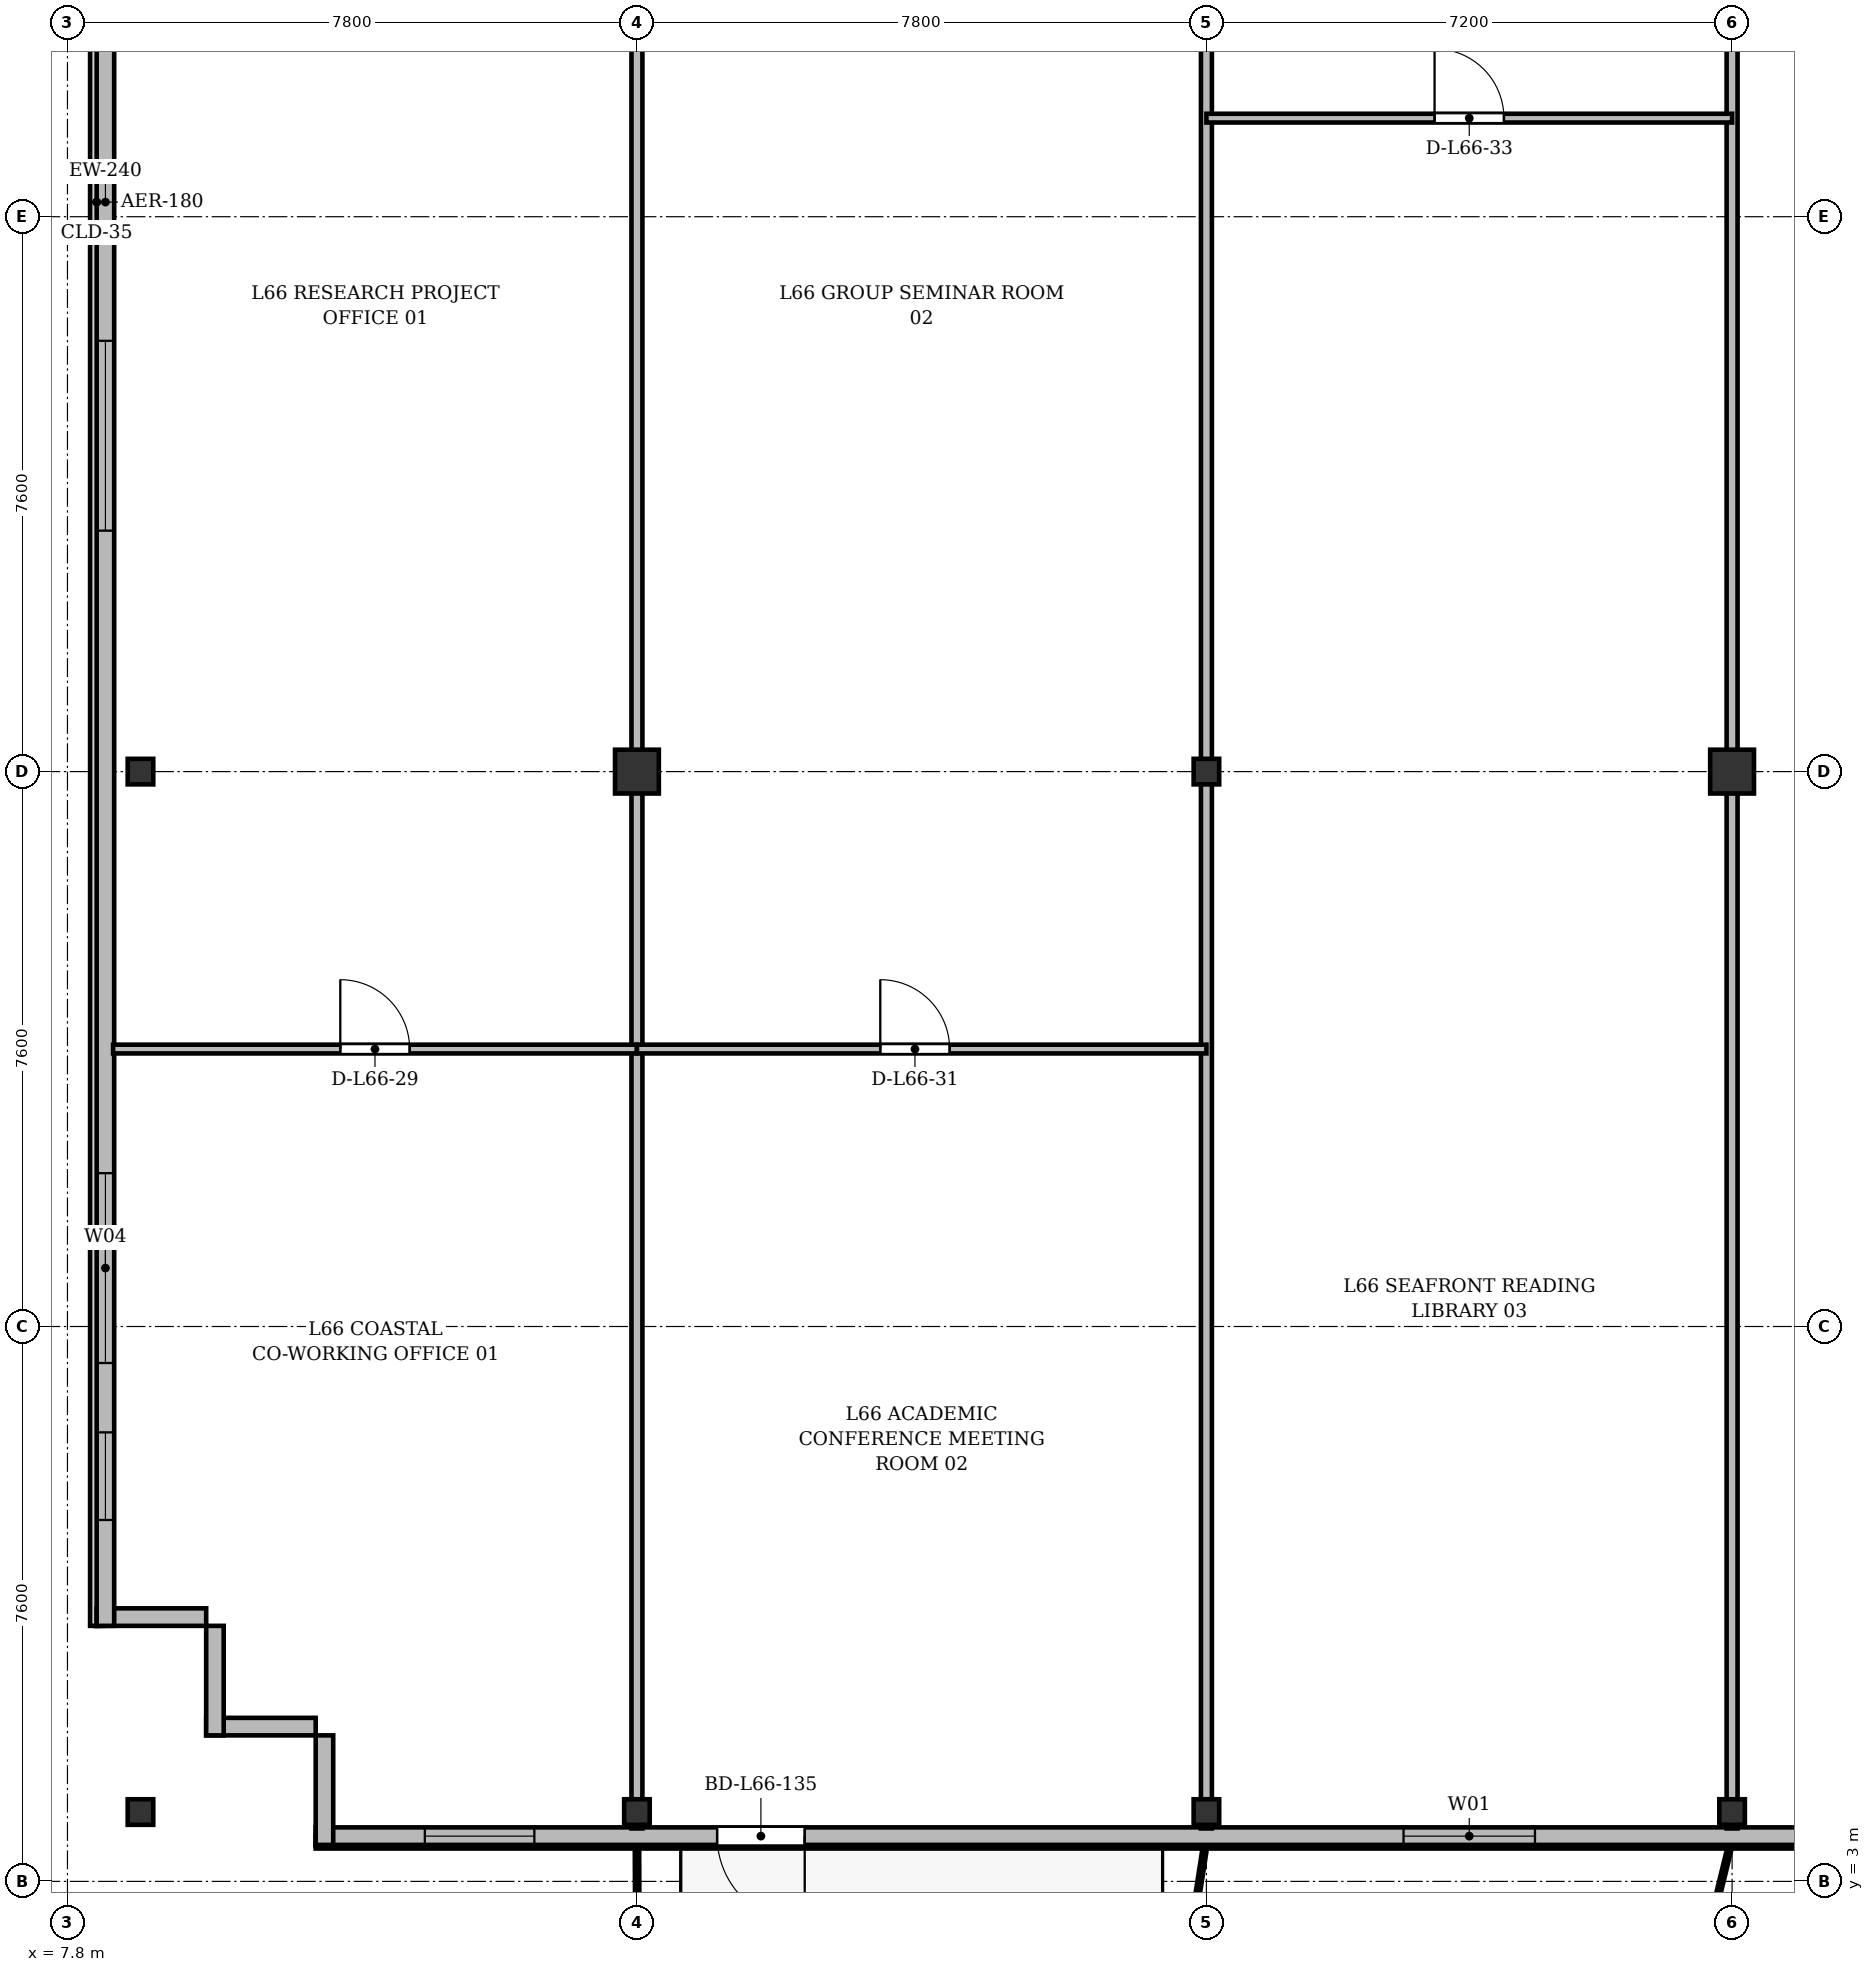
"""IFC4 building model, lengths in metres.
Left out: names, types, materials, properties, quantities, classifications, styles, units other than length and angle.
Written with IfcOpenShell. Run it as: python <this file> out.ifc"""

import sys

from ifc_helpers import new_model, si_unit, direction, frame, frame_2d, origin, origin_2d, place, context, subcontext, project, spatial, rectangle, i_section, extrude, source, transform, mapped, element, fill, save


model = new_model("IFC4")
c1 = context("Model", 3, precision=1e-05, world=origin(), true_north=direction((0.0, 1.0)))
c2 = subcontext(c1, "Body", "Model", "MODEL_VIEW")
j1 = project(units=[si_unit("LENGTHUNIT", "METRE"), si_unit("PLANEANGLEUNIT", "RADIAN")], contexts=[c1])
p1 = place(None, origin())
s1 = spatial("IfcSite", under=j1, at=p1, CompositionType="ELEMENT")
p2 = place(p1, origin())
s2 = spatial("IfcBuilding", under=s1, at=p2, CompositionType="ELEMENT")
p3 = place(p2, frame((0.0, 0.0, 255.9)))
s3 = spatial("IfcBuildingStorey", under=s2, at=p3, CompositionType="ELEMENT", Elevation=255.9)
m1 = source(origin(), c2, "Body", "SweptSolid", [
    extrude(i_section(OverallWidth=0.35, OverallDepth=0.35, WebThickness=0.018, FlangeThickness=0.028, at=origin_2d()), origin(), (0.0, 0.0, 1.0), 3.6),
])
for number, where, z_axis, x_axis in (
    (1, (8.8, 3.95, 0.0), (0.0, 0.0, 1.0), (1.0, 0.0, 0.0)),
    (2, (8.8, 18.2, 0.0), (0.0, 0.0, 1.0), (1.0, 0.0, 0.0)),
    (3, (15.6, 3.95, 0.0), (0.0, 0.0, 1.0), (1.0, 0.0, 0.0)),
):
    element("IfcColumn", number, at=place(p3, frame(where, z_axis=z_axis, x_axis=x_axis)), inside=s3, PredefinedType="COLUMN", context=c2, shape_type="MappedRepresentation", body=[
        mapped(m1, transform((0.0, 0.0, 0.0), x_axis=(1.0, 0.0, 0.0), y_axis=(0.0, 1.0, 0.0), z_axis=(0.0, 0.0, 1.0), scale=1.0)),
    ])
m2 = source(origin(), c2, "Body", "SweptSolid", [
    extrude(rectangle(XDim=0.6, YDim=0.6, at=origin_2d()), origin(), (0.0, 0.0, 1.0), 3.6),
])
p4 = place(p3, frame((15.6, 18.2, 0.0), z_axis=(0.0, 0.0, 1.0), x_axis=(1.0, 0.0, 0.0)))
e4 = element("IfcColumn", 4, at=p4, inside=s3, PredefinedType="COLUMN", context=c2, shape_type="MappedRepresentation", body=[
    mapped(m2, transform((0.0, 0.0, 0.0), x_axis=(1.0, 0.0, 0.0), y_axis=(0.0, 1.0, 0.0), z_axis=(0.0, 0.0, 1.0), scale=1.0)),
])
for number, where, z_axis, x_axis in (
    (5, (23.4, 3.95, 0.0), (0.0, 0.0, 1.0), (1.0, 0.0, 0.0)),
    (6, (23.4, 18.2, 0.0), (0.0, 0.0, 1.0), (1.0, 0.0, 0.0)),
    (7, (30.6, 3.95, 0.0), (0.0, 0.0, 1.0), (1.0, 0.0, 0.0)),
):
    element("IfcColumn", number, at=place(p3, frame(where, z_axis=z_axis, x_axis=x_axis)), inside=s3, PredefinedType="COLUMN", context=c2, shape_type="MappedRepresentation", body=[
        mapped(m1, transform((0.0, 0.0, 0.0), x_axis=(1.0, 0.0, 0.0), y_axis=(0.0, 1.0, 0.0), z_axis=(0.0, 0.0, 1.0), scale=1.0)),
    ])
p5 = place(p3, frame((30.6, 18.2, 0.0), z_axis=(0.0, 0.0, 1.0), x_axis=(1.0, 0.0, 0.0)))
e8 = element("IfcColumn", 8, at=p5, inside=s3, PredefinedType="COLUMN", context=c2, shape_type="MappedRepresentation", body=[
    mapped(m2, transform((0.0, 0.0, 0.0), x_axis=(1.0, 0.0, 0.0), y_axis=(0.0, 1.0, 0.0), z_axis=(0.0, 0.0, 1.0), scale=1.0)),
])
for number, where, z_axis, x_axis in (
    (9, (11.2, 5.12, 0.0), (0.0, 0.0, 1.0), (-1.0, 0.0, 0.0)),
    (10, (9.82, 5.0, 0.0), (0.0, 0.0, 1.0), (0.0, 1.0, 0.0)),
):
    element("IfcWall", number, at=place(p3, frame(where, z_axis=z_axis, x_axis=x_axis)), inside=s3, PredefinedType="SOLIDWALL", context=c2, shape_type="SweptSolid", body=[
        extrude(rectangle(XDim=1.5, YDim=0.24, at=frame_2d((0.75, 0.0))), origin(), (0.0, 0.0, 1.0), 3.37),
    ])
p6 = place(p3, frame((9.7, 6.62, 0.0), z_axis=(0.0, 0.0, 1.0), x_axis=(-1.0, 0.0, 0.0)))
e11 = element("IfcWall", 11, at=p6, inside=s3, PredefinedType="SOLIDWALL", context=c2, shape_type="SweptSolid", body=[
    extrude(rectangle(XDim=1.5, YDim=0.24, at=frame_2d((0.75, 0.0))), origin(), (0.0, 0.0, 1.0), 2.87),
])
p7 = place(p3, frame((8.32, 6.5, 0.0), z_axis=(0.0, 0.0, 1.0), x_axis=(0.0, 1.0, 0.0)))
e12 = element("IfcWall", 12, at=p7, inside=s3, PredefinedType="SOLIDWALL", context=c2, shape_type="SweptSolid", body=[
    extrude(rectangle(XDim=39.0, YDim=0.24, at=frame_2d((19.5, 0.0))), origin(), (0.0, 0.0, 1.0), 3.37),
])
p8 = place(p7, frame((1.45, 0.0, 0.92)))
e13 = element("IfcOpeningElement", 13, at=p8, cuts=e12, PredefinedType="OPENING", context=c2, shape_type="SweptSolid", body=[
    extrude(rectangle(XDim=1.2, YDim=1.65, at=frame_2d((0.6, 0.825))), frame((0.0, 0.13, 0.0), z_axis=(0.0, -1.0, 0.0), x_axis=(1.0, 0.0, 0.0)), (0.0, 0.0, 1.0), 0.26),
])
p9 = place(p7, frame((3.6, 0.0, 0.92)))
e14 = element("IfcOpeningElement", 14, at=p9, cuts=e12, PredefinedType="OPENING", context=c2, shape_type="SweptSolid", body=[
    extrude(rectangle(XDim=2.6, YDim=1.9, at=frame_2d((1.3, 0.95))), frame((0.0, 0.13, 0.0), z_axis=(0.0, -1.0, 0.0), x_axis=(1.0, 0.0, 0.0)), (0.0, 0.0, 1.0), 0.26),
])
p10 = place(p7, frame((15.0, 0.0, 0.92)))
e15 = element("IfcOpeningElement", 15, at=p10, cuts=e12, PredefinedType="OPENING", context=c2, shape_type="SweptSolid", body=[
    extrude(rectangle(XDim=2.6, YDim=1.9, at=frame_2d((1.3, 0.95))), frame((0.0, 0.13, 0.0), z_axis=(0.0, -1.0, 0.0), x_axis=(1.0, 0.0, 0.0)), (0.0, 0.0, 1.0), 0.26),
])
p11 = place(p7, frame((29.0, 0.0, 0.92)))
e16 = element("IfcOpeningElement", 16, at=p11, cuts=e12, PredefinedType="OPENING", context=c2, shape_type="SweptSolid", body=[
    extrude(rectangle(XDim=2.6, YDim=1.9, at=frame_2d((1.3, 0.95))), frame((0.0, 0.13, 0.0), z_axis=(0.0, -1.0, 0.0), x_axis=(1.0, 0.0, 0.0)), (0.0, 0.0, 1.0), 0.26),
])
p12 = place(p7, frame((33.3, 0.0, 0.92)))
e17 = element("IfcOpeningElement", 17, at=p12, cuts=e12, PredefinedType="OPENING", context=c2, shape_type="SweptSolid", body=[
    extrude(rectangle(XDim=1.2, YDim=1.65, at=frame_2d((0.6, 0.825))), frame((0.0, 0.13, 0.0), z_axis=(0.0, -1.0, 0.0), x_axis=(1.0, 0.0, 0.0)), (0.0, 0.0, 1.0), 0.26),
])
p13 = place(p7, frame((36.65, 0.0, 0.92)))
e18 = element("IfcOpeningElement", 18, at=p13, cuts=e12, PredefinedType="OPENING", context=c2, shape_type="SweptSolid", body=[
    extrude(rectangle(XDim=1.2, YDim=1.65, at=frame_2d((0.6, 0.825))), frame((0.0, 0.13, 0.0), z_axis=(0.0, -1.0, 0.0), x_axis=(1.0, 0.0, 0.0)), (0.0, 0.0, 1.0), 0.26),
])
p14 = place(p3, frame((63.2, 3.62, 0.0), z_axis=(0.0, 0.0, 1.0), x_axis=(-1.0, 0.0, 0.0)))
e19 = element("IfcWall", 19, at=p14, inside=s3, PredefinedType="SOLIDWALL", context=c2, shape_type="SweptSolid", body=[
    extrude(rectangle(XDim=52.0, YDim=0.24, at=frame_2d((26.0, 0.0))), origin(), (0.0, 0.0, 1.0), 3.37),
])
p15 = place(p14, frame((1.145, 0.0, 0.9)))
e20 = element("IfcOpeningElement", 20, at=p15, cuts=e19, PredefinedType="OPENING", context=c2, shape_type="SweptSolid", body=[
    extrude(rectangle(XDim=2.2, YDim=1.8, at=frame_2d((1.1, 0.9))), frame((0.0, 0.13, 0.0), z_axis=(0.0, -1.0, 0.0), x_axis=(1.0, 0.0, 0.0)), (0.0, 0.0, 1.0), 0.26),
])
p16 = place(p14, frame((7.55, 0.0, 0.9)))
e21 = element("IfcOpeningElement", 21, at=p16, cuts=e19, PredefinedType="OPENING", context=c2, shape_type="SweptSolid", body=[
    extrude(rectangle(XDim=1.5, YDim=1.75, at=frame_2d((0.75, 0.875))), frame((0.0, 0.13, 0.0), z_axis=(0.0, -1.0, 0.0), x_axis=(1.0, 0.0, 0.0)), (0.0, 0.0, 1.0), 0.26),
])
p17 = place(p14, frame((14.017, 0.0, 0.0)))
e22 = element("IfcOpeningElement", 22, at=p17, cuts=e19, PredefinedType="OPENING", context=c2, shape_type="SweptSolid", body=[
    extrude(rectangle(XDim=1.2, YDim=2.2, at=frame_2d((0.6, 1.1))), frame((0.0, 0.13, 0.0), z_axis=(0.0, -1.0, 0.0), x_axis=(1.0, 0.0, 0.0)), (0.0, 0.0, 1.0), 0.26),
])
p18 = place(p14, frame((25.175, 0.0, 0.9)))
e23 = element("IfcOpeningElement", 23, at=p18, cuts=e19, PredefinedType="OPENING", context=c2, shape_type="SweptSolid", body=[
    extrude(rectangle(XDim=1.65, YDim=1.85, at=frame_2d((0.825, 0.925))), frame((0.0, 0.13, 0.0), z_axis=(0.0, -1.0, 0.0), x_axis=(1.0, 0.0, 0.0)), (0.0, 0.0, 1.0), 0.26),
])
p19 = place(p14, frame((35.3, 0.0, 0.9)))
e24 = element("IfcOpeningElement", 24, at=p19, cuts=e19, PredefinedType="OPENING", context=c2, shape_type="SweptSolid", body=[
    extrude(rectangle(XDim=1.8, YDim=1.8, at=frame_2d((0.9, 0.9))), frame((0.0, 0.13, 0.0), z_axis=(0.0, -1.0, 0.0), x_axis=(1.0, 0.0, 0.0)), (0.0, 0.0, 1.0), 0.26),
])
p20 = place(p14, frame((45.302, 0.0, 0.0)))
e25 = element("IfcOpeningElement", 25, at=p20, cuts=e19, PredefinedType="OPENING", context=c2, shape_type="SweptSolid", body=[
    extrude(rectangle(XDim=1.2, YDim=2.2, at=frame_2d((0.6, 1.1))), frame((0.0, 0.13, 0.0), z_axis=(0.0, -1.0, 0.0), x_axis=(1.0, 0.0, 0.0)), (0.0, 0.0, 1.0), 0.26),
])
p21 = place(p14, frame((49.005, 0.0, 0.9)))
e26 = element("IfcOpeningElement", 26, at=p21, cuts=e19, PredefinedType="OPENING", context=c2, shape_type="SweptSolid", body=[
    extrude(rectangle(XDim=1.5, YDim=1.75, at=frame_2d((0.75, 0.875))), frame((0.0, 0.13, 0.0), z_axis=(0.0, -1.0, 0.0), x_axis=(1.0, 0.0, 0.0)), (0.0, 0.0, 1.0), 0.26),
])
p22 = place(p3, frame((11.32, 3.5, 0.0), z_axis=(0.0, 0.0, 1.0), x_axis=(0.0, 1.0, 0.0)))
e27 = element("IfcWall", 27, at=p22, inside=s3, PredefinedType="SOLIDWALL", context=c2, shape_type="SweptSolid", body=[
    extrude(rectangle(XDim=1.5, YDim=0.24, at=frame_2d((0.75, 0.0))), origin(), (0.0, 0.0, 1.0), 2.92),
])
for number, where, z_axis, x_axis in (
    (28, (15.6, 3.725, 0.0), (0.0, 0.0, 1.0), (0.0, 1.0, 0.0)),
    (29, (23.4, 3.725, 0.0), (0.0, 0.0, 1.0), (0.0, 1.0, 0.0)),
    (30, (30.6, 3.725, 0.0), (0.0, 0.0, 1.0), (0.0, 1.0, 0.0)),
):
    element("IfcWall", number, at=place(p3, frame(where, z_axis=z_axis, x_axis=x_axis)), inside=s3, PredefinedType="PARTITIONING", context=c2, shape_type="SweptSolid", body=[
        extrude(rectangle(XDim=27.275, YDim=0.15, at=frame_2d((13.637, 0.0))), origin(), (0.0, 0.0, 1.0), 2.87),
    ])
p23 = place(p3, frame((8.425, 14.4, 0.0), z_axis=(0.0, 0.0, 1.0), x_axis=(1.0, 0.0, 0.0)))
e31 = element("IfcWall", 31, at=p23, inside=s3, PredefinedType="PARTITIONING", context=c2, shape_type="SweptSolid", body=[
    extrude(rectangle(XDim=7.175, YDim=0.12, at=frame_2d((3.587, 0.0))), origin(), (0.0, 0.0, 1.0), 2.87),
])
p24 = place(p23, frame((3.112, 0.0, 0.0)))
e32 = element("IfcOpeningElement", 32, at=p24, cuts=e31, PredefinedType="OPENING", context=c2, shape_type="SweptSolid", body=[
    extrude(rectangle(XDim=0.95, YDim=2.15, at=frame_2d((0.475, 1.075))), frame((0.0, 0.07, 0.0), z_axis=(0.0, -1.0, 0.0), x_axis=(1.0, 0.0, 0.0)), (0.0, 0.0, 1.0), 0.14),
])
p25 = place(p3, frame((15.6, 14.4, 0.0), z_axis=(0.0, 0.0, 1.0), x_axis=(1.0, 0.0, 0.0)))
e33 = element("IfcWall", 33, at=p25, inside=s3, PredefinedType="PARTITIONING", context=c2, shape_type="SweptSolid", body=[
    extrude(rectangle(XDim=7.8, YDim=0.12, at=frame_2d((3.9, 0.0))), origin(), (0.0, 0.0, 1.0), 2.87),
])
p26 = place(p25, frame((3.333, 0.0, 0.0)))
e34 = element("IfcOpeningElement", 34, at=p26, cuts=e33, PredefinedType="OPENING", context=c2, shape_type="SweptSolid", body=[
    extrude(rectangle(XDim=0.95, YDim=2.15, at=frame_2d((0.475, 1.075))), frame((0.0, 0.07, 0.0), z_axis=(0.0, -1.0, 0.0), x_axis=(1.0, 0.0, 0.0)), (0.0, 0.0, 1.0), 0.14),
])
p27 = place(p3, frame((23.4, 27.15, 0.0), z_axis=(0.0, 0.0, 1.0), x_axis=(1.0, 0.0, 0.0)))
e35 = element("IfcWall", 35, at=p27, inside=s3, PredefinedType="PARTITIONING", context=c2, shape_type="SweptSolid", body=[
    extrude(rectangle(XDim=7.2, YDim=0.12, at=frame_2d((3.6, 0.0))), origin(), (0.0, 0.0, 1.0), 2.87),
])
p28 = place(p27, frame((3.125, 0.0, 0.0)))
e36 = element("IfcOpeningElement", 36, at=p28, cuts=e35, PredefinedType="OPENING", context=c2, shape_type="SweptSolid", body=[
    extrude(rectangle(XDim=0.95, YDim=2.15, at=frame_2d((0.475, 1.075))), frame((0.0, 0.07, 0.0), z_axis=(0.0, -1.0, 0.0), x_axis=(1.0, 0.0, 0.0)), (0.0, 0.0, 1.0), 0.14),
])
m3 = source(origin(), c2, "Body", "SweptSolid", [
    extrude(rectangle(XDim=1.2, YDim=1.65, at=frame_2d((0.6, 0.825))), frame((0.0, 0.03, 0.0), z_axis=(0.0, -1.0, 0.0), x_axis=(1.0, 0.0, 0.0)), (0.0, 0.0, 1.0), 0.06),
])
p29 = place(p8, origin())
e37 = element("IfcWindow", 37, at=p29, inside=s3, PartitioningType="SINGLE_PANEL", PredefinedType="WINDOW", context=c2, shape_type="MappedRepresentation", body=[
    mapped(m3, transform((0.0, 0.0, 0.0), x_axis=(1.0, 0.0, 0.0), y_axis=(0.0, 1.0, 0.0), z_axis=(0.0, 0.0, 1.0), scale=1.0)),
])
fill(e13, e37)
m4 = source(origin(), c2, "Body", "SweptSolid", [
    extrude(rectangle(XDim=2.6, YDim=1.9, at=frame_2d((1.3, 0.95))), frame((0.0, 0.03, 0.0), z_axis=(0.0, -1.0, 0.0), x_axis=(1.0, 0.0, 0.0)), (0.0, 0.0, 1.0), 0.06),
])
p30 = place(p9, origin())
e38 = element("IfcWindow", 38, at=p30, inside=s3, PartitioningType="SINGLE_PANEL", PredefinedType="WINDOW", context=c2, shape_type="MappedRepresentation", body=[
    mapped(m4, transform((0.0, 0.0, 0.0), x_axis=(1.0, 0.0, 0.0), y_axis=(0.0, 1.0, 0.0), z_axis=(0.0, 0.0, 1.0), scale=1.0)),
])
fill(e14, e38)
p31 = place(p10, origin())
e39 = element("IfcWindow", 39, at=p31, inside=s3, PartitioningType="SINGLE_PANEL", PredefinedType="WINDOW", context=c2, shape_type="MappedRepresentation", body=[
    mapped(m4, transform((0.0, 0.0, 0.0), x_axis=(1.0, 0.0, 0.0), y_axis=(0.0, 1.0, 0.0), z_axis=(0.0, 0.0, 1.0), scale=1.0)),
])
fill(e15, e39)
m5 = source(origin(), c2, "Body", "SweptSolid", [
    extrude(rectangle(XDim=1.8, YDim=1.8, at=frame_2d((0.9, 0.9))), frame((0.0, 0.03, 0.0), z_axis=(0.0, -1.0, 0.0), x_axis=(1.0, 0.0, 0.0)), (0.0, 0.0, 1.0), 0.06),
])
p32 = place(p19, origin())
e40 = element("IfcWindow", 40, at=p32, inside=s3, PartitioningType="SINGLE_PANEL", PredefinedType="WINDOW", context=c2, shape_type="MappedRepresentation", body=[
    mapped(m5, transform((0.0, 0.0, 0.0), x_axis=(1.0, 0.0, 0.0), y_axis=(0.0, 1.0, 0.0), z_axis=(0.0, 0.0, 1.0), scale=1.0)),
])
fill(e24, e40)
m6 = source(origin(), c2, "Body", "SweptSolid", [
    extrude(rectangle(XDim=1.2, YDim=2.2, at=frame_2d((0.6, 1.1))), frame((0.0, 0.025, 0.0), z_axis=(0.0, -1.0, 0.0), x_axis=(1.0, 0.0, 0.0)), (0.0, 0.0, 1.0), 0.05),
])
p33 = place(p20, origin())
e41 = element("IfcDoor", 41, at=p33, inside=s3, OperationType="SINGLE_SWING_LEFT", PredefinedType="DOOR", context=c2, shape_type="MappedRepresentation", body=[
    mapped(m6, transform((0.0, 0.0, 0.0), x_axis=(1.0, 0.0, 0.0), y_axis=(0.0, 1.0, 0.0), z_axis=(0.0, 0.0, 1.0), scale=1.0)),
])
fill(e25, e41)
m7 = source(origin(), c2, "Body", "SweptSolid", [
    extrude(rectangle(XDim=1.5, YDim=1.75, at=frame_2d((0.75, 0.875))), frame((0.0, 0.03, 0.0), z_axis=(0.0, -1.0, 0.0), x_axis=(1.0, 0.0, 0.0)), (0.0, 0.0, 1.0), 0.06),
])
p34 = place(p21, origin())
e42 = element("IfcWindow", 42, at=p34, inside=s3, PartitioningType="SINGLE_PANEL", PredefinedType="WINDOW", context=c2, shape_type="MappedRepresentation", body=[
    mapped(m7, transform((0.0, 0.0, 0.0), x_axis=(1.0, 0.0, 0.0), y_axis=(0.0, 1.0, 0.0), z_axis=(0.0, 0.0, 1.0), scale=1.0)),
])
fill(e26, e42)
m8 = source(origin(), c2, "Body", "SweptSolid", [
    extrude(rectangle(XDim=0.95, YDim=2.15, at=frame_2d((0.475, 1.075))), frame((0.0, 0.025, 0.0), z_axis=(0.0, -1.0, 0.0), x_axis=(1.0, 0.0, 0.0)), (0.0, 0.0, 1.0), 0.05),
])
p35 = place(p24, origin())
e43 = element("IfcDoor", 43, at=p35, inside=s3, OperationType="SINGLE_SWING_LEFT", PredefinedType="DOOR", context=c2, shape_type="MappedRepresentation", body=[
    mapped(m8, transform((0.0, 0.0, 0.0), x_axis=(1.0, 0.0, 0.0), y_axis=(0.0, 1.0, 0.0), z_axis=(0.0, 0.0, 1.0), scale=1.0)),
])
fill(e32, e43)
p36 = place(p26, origin())
e44 = element("IfcDoor", 44, at=p36, inside=s3, OperationType="SINGLE_SWING_LEFT", PredefinedType="DOOR", context=c2, shape_type="MappedRepresentation", body=[
    mapped(m8, transform((0.0, 0.0, 0.0), x_axis=(1.0, 0.0, 0.0), y_axis=(0.0, 1.0, 0.0), z_axis=(0.0, 0.0, 1.0), scale=1.0)),
])
fill(e34, e44)
p37 = place(p28, origin())
e45 = element("IfcDoor", 45, at=p37, inside=s3, OperationType="SINGLE_SWING_LEFT", PredefinedType="DOOR", context=c2, shape_type="MappedRepresentation", body=[
    mapped(m8, transform((0.0, 0.0, 0.0), x_axis=(1.0, 0.0, 0.0), y_axis=(0.0, 1.0, 0.0), z_axis=(0.0, 0.0, 1.0), scale=1.0)),
])
fill(e36, e45)
save(model, sys.argv[1])
